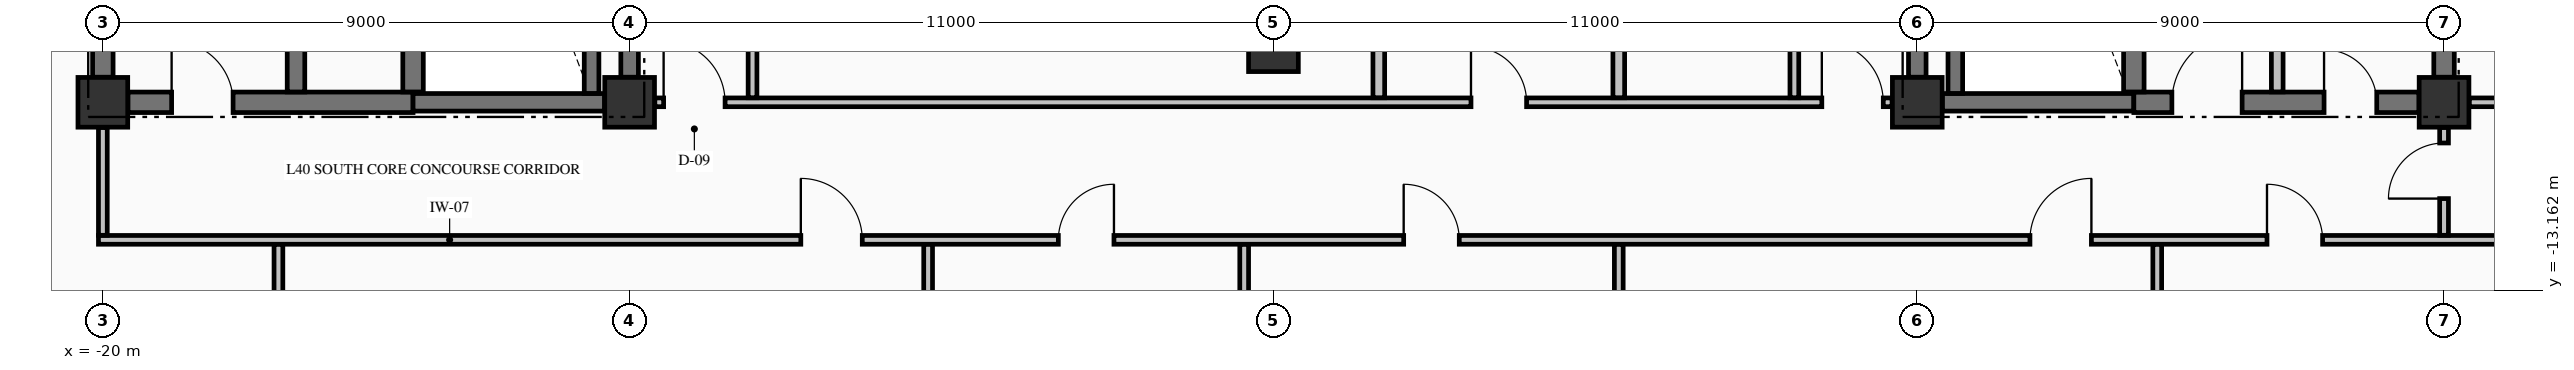
"""IFC4 building model, lengths in metres.
Left out: names, types, materials, properties, quantities, classifications, styles, units other than length and angle.
Written with IfcOpenShell. Run it as: python <this file> out.ifc"""

import sys

from ifc_helpers import new_model, si_unit, direction, frame, frame_2d, origin, origin_2d, place, context, subcontext, project, spatial, rectangle, extrude, element, fill, save


model = new_model("IFC4")
c1 = context("Model", 3, precision=1e-05, world=origin(), true_north=direction((0.0, 1.0)))
c2 = subcontext(c1, "Body", "Model", "MODEL_VIEW")
j1 = project(units=[si_unit("LENGTHUNIT", "METRE"), si_unit("PLANEANGLEUNIT", "RADIAN")], contexts=[c1])
p1 = place(None, origin())
s1 = spatial("IfcSite", under=j1, at=p1, CompositionType="ELEMENT")
p2 = place(p1, origin())
s2 = spatial("IfcBuilding", under=s1, at=p2, CompositionType="ELEMENT")
p3 = place(p2, frame((0.0, 0.0, 158.24)))
s3 = spatial("IfcBuildingStorey", under=s2, at=p3, CompositionType="ELEMENT", Elevation=158.24)
for number, where, z_axis, x_axis in (
    (1, (-20.0, -9.95, -0.425), (0.0, 0.0, 1.0), (1.0, 0.0, 0.0)),
    (2, (-11.0, -9.95, -0.425), (0.0, 0.0, 1.0), (1.0, 0.0, 0.0)),
    (3, (11.0, -9.95, -0.425), (0.0, 0.0, 1.0), (1.0, 0.0, 0.0)),
    (4, (20.0, -9.95, -0.425), (0.0, 0.0, 1.0), (1.0, 0.0, 0.0)),
    (5, (0.0, -9.0, -0.425), (0.0, 0.0, 1.0), (1.0, 0.0, 0.0)),
):
    element("IfcColumn", number, at=place(p3, frame(where, z_axis=z_axis, x_axis=x_axis)), inside=s3, PredefinedType="COLUMN", context=c2, shape_type="SweptSolid", body=[
        extrude(rectangle(XDim=0.85, YDim=0.85, at=origin_2d()), origin(), (0.0, 0.0, 1.0), 4.595),
    ])
p4 = place(p3, frame((-19.571, -9.95, 0.0), z_axis=(0.0, 0.0, 1.0), x_axis=(1.0, 0.0, 0.0)))
e6 = element("IfcWall", 6, at=p4, inside=s3, PredefinedType="SHEAR", context=c2, shape_type="SweptSolid", body=[
    extrude(rectangle(XDim=4.871, YDim=0.35, at=frame_2d((2.436, 0.0))), origin(), (0.0, 0.0, 1.0), 4.17),
])
p5 = place(p4, frame((0.746, 0.0, 0.0)))
e7 = element("IfcOpeningElement", 7, at=p5, cuts=e6, PredefinedType="OPENING", context=c2, shape_type="SweptSolid", body=[
    extrude(rectangle(XDim=1.05, YDim=2.15, at=frame_2d((0.525, 1.075))), frame((0.0, 0.185, 0.0), z_axis=(0.0, -1.0, 0.0), x_axis=(1.0, 0.0, 0.0)), (0.0, 0.0, 1.0), 0.37),
])
for number, where, z_axis, x_axis in (
    (8, (-14.7, -9.95, 0.0), (0.0, 0.0, 1.0), (1.0, 0.0, 0.0)),
    (9, (11.429, -9.95, 0.0), (0.0, 0.0, 1.0), (1.0, 0.0, 0.0)),
):
    element("IfcWall", number, at=place(p3, frame(where, z_axis=z_axis, x_axis=x_axis)), inside=s3, PredefinedType="SHEAR", context=c2, shape_type="SweptSolid", body=[
        extrude(rectangle(XDim=3.271, YDim=0.3, at=frame_2d((1.635, 0.0))), origin(), (0.0, 0.0, 1.0), 4.17),
    ])
p6 = place(p3, frame((14.7, -9.95, 0.0), z_axis=(0.0, 0.0, 1.0), x_axis=(1.0, 0.0, 0.0)))
e10 = element("IfcWall", 10, at=p6, inside=s3, PredefinedType="SHEAR", context=c2, shape_type="SweptSolid", body=[
    extrude(rectangle(XDim=4.871, YDim=0.35, at=frame_2d((2.436, 0.0))), origin(), (0.0, 0.0, 1.0), 4.17),
])
p7 = place(p6, frame((0.65, 0.0, 0.0)))
e11 = element("IfcOpeningElement", 11, at=p7, cuts=e10, PredefinedType="OPENING", context=c2, shape_type="SweptSolid", body=[
    extrude(rectangle(XDim=1.2, YDim=2.15, at=frame_2d((0.6, 1.075))), frame((0.0, 0.185, 0.0), z_axis=(0.0, -1.0, 0.0), x_axis=(1.0, 0.0, 0.0)), (0.0, 0.0, 1.0), 0.37),
])
p8 = place(p6, frame((3.25, 0.0, 0.0)))
e12 = element("IfcOpeningElement", 12, at=p8, cuts=e10, PredefinedType="OPENING", context=c2, shape_type="SweptSolid", body=[
    extrude(rectangle(XDim=0.9, YDim=2.15, at=frame_2d((0.45, 1.075))), frame((0.0, 0.185, 0.0), z_axis=(0.0, -1.0, 0.0), x_axis=(1.0, 0.0, 0.0)), (0.0, 0.0, 1.0), 0.37),
])
p9 = place(p3, frame((-20.075, -12.3, 0.0), z_axis=(0.0, 0.0, 1.0), x_axis=(1.0, 0.0, 0.0)))
e13 = element("IfcWall", 13, at=p9, inside=s3, PredefinedType="PARTITIONING", context=c2, shape_type="SweptSolid", body=[
    extrude(rectangle(XDim=46.91, YDim=0.15, at=frame_2d((23.455, 0.0))), origin(), (0.0, 0.0, 1.0), 4.17),
])
p10 = place(p9, frame((12.0, 0.0, 0.0)))
e14 = element("IfcOpeningElement", 14, at=p10, cuts=e13, PredefinedType="OPENING", context=c2, shape_type="SweptSolid", body=[
    extrude(rectangle(XDim=1.05, YDim=2.15, at=frame_2d((0.525, 1.075))), frame((0.0, 0.085, 0.0), z_axis=(0.0, -1.0, 0.0), x_axis=(1.0, 0.0, 0.0)), (0.0, 0.0, 1.0), 0.17),
])
p11 = place(p9, frame((16.4, 0.0, 0.0)))
e15 = element("IfcOpeningElement", 15, at=p11, cuts=e13, PredefinedType="OPENING", context=c2, shape_type="SweptSolid", body=[
    extrude(rectangle(XDim=0.95, YDim=2.15, at=frame_2d((0.475, 1.075))), frame((0.0, 0.085, 0.0), z_axis=(0.0, -1.0, 0.0), x_axis=(1.0, 0.0, 0.0)), (0.0, 0.0, 1.0), 0.17),
])
p12 = place(p9, frame((22.3, 0.0, 0.0)))
e16 = element("IfcOpeningElement", 16, at=p12, cuts=e13, PredefinedType="OPENING", context=c2, shape_type="SweptSolid", body=[
    extrude(rectangle(XDim=0.95, YDim=2.15, at=frame_2d((0.475, 1.075))), frame((0.0, 0.085, 0.0), z_axis=(0.0, -1.0, 0.0), x_axis=(1.0, 0.0, 0.0)), (0.0, 0.0, 1.0), 0.17),
])
p13 = place(p9, frame((33.0, 0.0, 0.0)))
e17 = element("IfcOpeningElement", 17, at=p13, cuts=e13, PredefinedType="OPENING", context=c2, shape_type="SweptSolid", body=[
    extrude(rectangle(XDim=1.05, YDim=2.15, at=frame_2d((0.525, 1.075))), frame((0.0, 0.085, 0.0), z_axis=(0.0, -1.0, 0.0), x_axis=(1.0, 0.0, 0.0)), (0.0, 0.0, 1.0), 0.17),
])
p14 = place(p9, frame((37.05, 0.0, 0.0)))
e18 = element("IfcOpeningElement", 18, at=p14, cuts=e13, PredefinedType="OPENING", context=c2, shape_type="SweptSolid", body=[
    extrude(rectangle(XDim=0.95, YDim=2.15, at=frame_2d((0.475, 1.075))), frame((0.0, 0.085, 0.0), z_axis=(0.0, -1.0, 0.0), x_axis=(1.0, 0.0, 0.0)), (0.0, 0.0, 1.0), 0.17),
])
p15 = place(p3, frame((-10.569, -9.95, 0.0), z_axis=(0.0, 0.0, 1.0), x_axis=(1.0, 0.0, 0.0)))
e19 = element("IfcWall", 19, at=p15, inside=s3, PredefinedType="PARTITIONING", context=c2, shape_type="SweptSolid", body=[
    extrude(rectangle(XDim=21.138, YDim=0.15, at=frame_2d((10.569, 0.0))), origin(), (0.0, 0.0, 1.0), 4.17),
])
p16 = place(p15, frame((0.15, 0.0, 0.0)))
e20 = element("IfcOpeningElement", 20, at=p16, cuts=e19, PredefinedType="OPENING", context=c2, shape_type="SweptSolid", body=[
    extrude(rectangle(XDim=1.05, YDim=2.15, at=frame_2d((0.525, 1.075))), frame((0.0, 0.085, 0.0), z_axis=(0.0, -1.0, 0.0), x_axis=(1.0, 0.0, 0.0)), (0.0, 0.0, 1.0), 0.17),
])
p17 = place(p15, frame((19.938, 0.0, 0.0)))
e21 = element("IfcOpeningElement", 21, at=p17, cuts=e19, PredefinedType="OPENING", context=c2, shape_type="SweptSolid", body=[
    extrude(rectangle(XDim=1.05, YDim=2.15, at=frame_2d((0.525, 1.075))), frame((0.0, 0.085, 0.0), z_axis=(0.0, -1.0, 0.0), x_axis=(1.0, 0.0, 0.0)), (0.0, 0.0, 1.0), 0.17),
])
p18 = place(p15, frame((13.944, 0.0, 0.0)))
e22 = element("IfcOpeningElement", 22, at=p18, cuts=e19, PredefinedType="OPENING", context=c2, shape_type="SweptSolid", body=[
    extrude(rectangle(XDim=0.95, YDim=2.15, at=frame_2d((0.475, 1.075))), frame((0.0, 0.085, 0.0), z_axis=(0.0, -1.0, 0.0), x_axis=(1.0, 0.0, 0.0)), (0.0, 0.0, 1.0), 0.17),
])
p19 = place(p3, frame((20.431, -9.95, 0.0), z_axis=(0.0, 0.0, 1.0), x_axis=(1.0, 0.0, 0.0)))
e23 = element("IfcWall", 23, at=p19, inside=s3, PredefinedType="PARTITIONING", context=c2, shape_type="SweptSolid", body=[
    extrude(rectangle(XDim=6.404, YDim=0.15, at=frame_2d((3.202, 0.0))), origin(), (0.0, 0.0, 1.0), 4.17),
])
p20 = place(p19, frame((2.594, 0.0, 0.0)))
e24 = element("IfcOpeningElement", 24, at=p20, cuts=e23, PredefinedType="OPENING", context=c2, shape_type="SweptSolid", body=[
    extrude(rectangle(XDim=0.95, YDim=2.15, at=frame_2d((0.475, 1.075))), frame((0.0, 0.085, 0.0), z_axis=(0.0, -1.0, 0.0), x_axis=(1.0, 0.0, 0.0)), (0.0, 0.0, 1.0), 0.17),
])
p21 = place(p3, frame((-20.0, -9.521, 0.0), z_axis=(0.0, 0.0, 1.0), x_axis=(0.0, 1.0, 0.0)))
e25 = element("IfcWall", 25, at=p21, inside=s3, PredefinedType="SHEAR", context=c2, shape_type="SweptSolid", body=[
    extrude(rectangle(XDim=9.092, YDim=0.35, at=frame_2d((4.546, 0.0))), origin(), (0.0, 0.0, 1.0), 4.17),
])
p22 = place(p3, frame((-16.7, -9.773, 0.0), z_axis=(0.0, 0.0, 1.0), x_axis=(0.0, 1.0, 0.0)))
e26 = element("IfcWall", 26, at=p22, inside=s3, PredefinedType="SHEAR", context=c2, shape_type="SweptSolid", body=[
    extrude(rectangle(XDim=9.371, YDim=0.3, at=frame_2d((4.686, 0.0))), origin(), (0.0, 0.0, 1.0), 4.17),
])
p23 = place(p3, frame((-14.7, -9.773, 0.0), z_axis=(0.0, 0.0, 1.0), x_axis=(0.0, 1.0, 0.0)))
e27 = element("IfcWall", 27, at=p23, inside=s3, PredefinedType="SHEAR", context=c2, shape_type="SweptSolid", body=[
    extrude(rectangle(XDim=9.371, YDim=0.35, at=frame_2d((4.686, 0.0))), origin(), (0.0, 0.0, 1.0), 4.17),
])
p24 = place(p3, frame((-11.65, -9.798, 0.0), z_axis=(0.0, 0.0, 1.0), x_axis=(0.0, 1.0, 0.0)))
e28 = element("IfcWall", 28, at=p24, inside=s3, PredefinedType="SOLIDWALL", context=c2, shape_type="SweptSolid", body=[
    extrude(rectangle(XDim=9.396, YDim=0.25, at=frame_2d((4.698, 0.0))), origin(), (0.0, 0.0, 1.0), 4.17),
])
for number, where, z_axis, x_axis in (
    (29, (-11.0, -9.521, 0.0), (0.0, 0.0, 1.0), (0.0, 1.0, 0.0)),
    (30, (11.0, -9.521, 0.0), (0.0, 0.0, 1.0), (0.0, 1.0, 0.0)),
):
    element("IfcWall", number, at=place(p3, frame(where, z_axis=z_axis, x_axis=x_axis)), inside=s3, PredefinedType="SHEAR", context=c2, shape_type="SweptSolid", body=[
        extrude(rectangle(XDim=9.092, YDim=0.3, at=frame_2d((4.546, 0.0))), origin(), (0.0, 0.0, 1.0), 4.17),
    ])
p25 = place(p3, frame((11.65, -9.798, 0.0), z_axis=(0.0, 0.0, 1.0), x_axis=(0.0, 1.0, 0.0)))
e31 = element("IfcWall", 31, at=p25, inside=s3, PredefinedType="SOLIDWALL", context=c2, shape_type="SweptSolid", body=[
    extrude(rectangle(XDim=9.396, YDim=0.25, at=frame_2d((4.698, 0.0))), origin(), (0.0, 0.0, 1.0), 4.17),
])
p26 = place(p3, frame((14.7, -9.773, 0.0), z_axis=(0.0, 0.0, 1.0), x_axis=(0.0, 1.0, 0.0)))
e32 = element("IfcWall", 32, at=p26, inside=s3, PredefinedType="SHEAR", context=c2, shape_type="SweptSolid", body=[
    extrude(rectangle(XDim=9.371, YDim=0.35, at=frame_2d((4.686, 0.0))), origin(), (0.0, 0.0, 1.0), 4.17),
])
p27 = place(p3, frame((20.0, -9.521, 0.0), z_axis=(0.0, 0.0, 1.0), x_axis=(0.0, 1.0, 0.0)))
e33 = element("IfcWall", 33, at=p27, inside=s3, PredefinedType="SHEAR", context=c2, shape_type="SweptSolid", body=[
    extrude(rectangle(XDim=2.344, YDim=0.35, at=frame_2d((1.172, 0.0))), origin(), (0.0, 0.0, 1.0), 4.17),
])
p28 = place(p3, frame((-20.0, -12.222, 0.0), z_axis=(0.0, 0.0, 1.0), x_axis=(0.0, 1.0, 0.0)))
e34 = element("IfcWall", 34, at=p28, inside=s3, PredefinedType="PARTITIONING", context=c2, shape_type="SweptSolid", body=[
    extrude(rectangle(XDim=1.841, YDim=0.15, at=frame_2d((0.92, 0.0))), origin(), (0.0, 0.0, 1.0), 3.36),
])
p29 = place(p3, frame((-17.0, -18.994, 0.0), z_axis=(0.0, 0.0, 1.0), x_axis=(0.0, 1.0, 0.0)))
e35 = element("IfcWall", 35, at=p29, inside=s3, PredefinedType="PARTITIONING", context=c2, shape_type="SweptSolid", body=[
    extrude(rectangle(XDim=6.616, YDim=0.15, at=frame_2d((3.308, 0.0))), origin(), (0.0, 0.0, 1.0), 4.17),
])
p30 = place(p3, frame((-8.9, -9.872, 0.0), z_axis=(0.0, 0.0, 1.0), x_axis=(0.0, 1.0, 0.0)))
e36 = element("IfcWall", 36, at=p30, inside=s3, PredefinedType="PARTITIONING", context=c2, shape_type="SweptSolid", body=[
    extrude(rectangle(XDim=5.769, YDim=0.15, at=frame_2d((2.885, 0.0))), origin(), (0.0, 0.0, 1.0), 4.17),
])
p31 = place(p30, frame((2.427, 0.0, 0.0)))
e37 = element("IfcOpeningElement", 37, at=p31, cuts=e36, PredefinedType="OPENING", context=c2, shape_type="SweptSolid", body=[
    extrude(rectangle(XDim=0.95, YDim=2.15, at=frame_2d((0.475, 1.075))), frame((0.0, 0.085, 0.0), z_axis=(0.0, -1.0, 0.0), x_axis=(1.0, 0.0, 0.0)), (0.0, 0.0, 1.0), 0.17),
])
p32 = place(p3, frame((-5.9, -24.335, 0.0), z_axis=(0.0, 0.0, 1.0), x_axis=(0.0, 1.0, 0.0)))
e38 = element("IfcWall", 38, at=p32, inside=s3, PredefinedType="PARTITIONING", context=c2, shape_type="SweptSolid", body=[
    extrude(rectangle(XDim=11.957, YDim=0.15, at=frame_2d((5.979, 0.0))), origin(), (0.0, 0.0, 1.0), 4.17),
])
p33 = place(p3, frame((-0.5, -23.994, 0.0), z_axis=(0.0, 0.0, 1.0), x_axis=(0.0, 1.0, 0.0)))
e39 = element("IfcWall", 39, at=p33, inside=s3, PredefinedType="PARTITIONING", context=c2, shape_type="SweptSolid", body=[
    extrude(rectangle(XDim=11.616, YDim=0.15, at=frame_2d((5.808, 0.0))), origin(), (0.0, 0.0, 1.0), 4.17),
])
p34 = place(p3, frame((1.8, -9.872, 0.0), z_axis=(0.0, 0.0, 1.0), x_axis=(0.0, 1.0, 0.0)))
e40 = element("IfcWall", 40, at=p34, inside=s3, PredefinedType="PARTITIONING", context=c2, shape_type="SweptSolid", body=[
    extrude(rectangle(XDim=4.969, YDim=0.2, at=frame_2d((2.484, 0.0))), origin(), (0.0, 0.0, 1.0), 4.17),
])
p35 = place(p3, frame((5.9, -24.335, 0.0), z_axis=(0.0, 0.0, 1.0), x_axis=(0.0, 1.0, 0.0)))
e41 = element("IfcWall", 41, at=p35, inside=s3, PredefinedType="PARTITIONING", context=c2, shape_type="SweptSolid", body=[
    extrude(rectangle(XDim=11.957, YDim=0.15, at=frame_2d((5.979, 0.0))), origin(), (0.0, 0.0, 1.0), 4.17),
])
p36 = place(p3, frame((5.9, -9.872, 0.0), z_axis=(0.0, 0.0, 1.0), x_axis=(0.0, 1.0, 0.0)))
e42 = element("IfcWall", 42, at=p36, inside=s3, PredefinedType="PARTITIONING", context=c2, shape_type="SweptSolid", body=[
    extrude(rectangle(XDim=4.969, YDim=0.2, at=frame_2d((2.484, 0.0))), origin(), (0.0, 0.0, 1.0), 4.17),
])
p37 = place(p3, frame((8.9, -9.872, 0.0), z_axis=(0.0, 0.0, 1.0), x_axis=(0.0, 1.0, 0.0)))
e43 = element("IfcWall", 43, at=p37, inside=s3, PredefinedType="PARTITIONING", context=c2, shape_type="SweptSolid", body=[
    extrude(rectangle(XDim=4.969, YDim=0.15, at=frame_2d((2.484, 0.0))), origin(), (0.0, 0.0, 1.0), 4.17),
])
p38 = place(p37, frame((1.997, 0.0, 0.0)))
e44 = element("IfcOpeningElement", 44, at=p38, cuts=e43, PredefinedType="OPENING", context=c2, shape_type="SweptSolid", body=[
    extrude(rectangle(XDim=0.95, YDim=2.15, at=frame_2d((0.475, 1.075))), frame((0.0, 0.085, 0.0), z_axis=(0.0, -1.0, 0.0), x_axis=(1.0, 0.0, 0.0)), (0.0, 0.0, 1.0), 0.17),
])
p39 = place(p3, frame((15.1, -24.335, 0.0), z_axis=(0.0, 0.0, 1.0), x_axis=(0.0, 1.0, 0.0)))
e45 = element("IfcWall", 45, at=p39, inside=s3, PredefinedType="PARTITIONING", context=c2, shape_type="SweptSolid", body=[
    extrude(rectangle(XDim=11.957, YDim=0.15, at=frame_2d((5.979, 0.0))), origin(), (0.0, 0.0, 1.0), 4.17),
])
p40 = place(p3, frame((17.15, -9.772, 0.0), z_axis=(0.0, 0.0, 1.0), x_axis=(0.0, 1.0, 0.0)))
e46 = element("IfcWall", 46, at=p40, inside=s3, PredefinedType="PARTITIONING", context=c2, shape_type="SweptSolid", body=[
    extrude(rectangle(XDim=2.594, YDim=0.2, at=frame_2d((1.297, 0.0))), origin(), (0.0, 0.0, 1.0), 4.17),
])
p41 = place(p3, frame((20.0, -12.222, 0.0), z_axis=(0.0, 0.0, 1.0), x_axis=(0.0, 1.0, 0.0)))
e47 = element("IfcWall", 47, at=p41, inside=s3, PredefinedType="PARTITIONING", context=c2, shape_type="SweptSolid", body=[
    extrude(rectangle(XDim=1.841, YDim=0.15, at=frame_2d((0.92, 0.0))), origin(), (0.0, 0.0, 1.0), 3.36),
])
p42 = place(p41, frame((0.627, 0.0, 0.0)))
e48 = element("IfcOpeningElement", 48, at=p42, cuts=e47, PredefinedType="OPENING", context=c2, shape_type="SweptSolid", body=[
    extrude(rectangle(XDim=0.95, YDim=2.15, at=frame_2d((0.475, 1.075))), frame((0.0, 0.085, 0.0), z_axis=(0.0, -1.0, 0.0), x_axis=(1.0, 0.0, 0.0)), (0.0, 0.0, 1.0), 0.17),
])
p43 = place(p5, origin())
e49 = element("IfcDoor", 49, at=p43, inside=s3, OperationType="SINGLE_SWING_LEFT", PredefinedType="DOOR", context=c2, shape_type="SweptSolid", body=[
    extrude(rectangle(XDim=1.05, YDim=2.15, at=frame_2d((0.525, 1.075))), frame((0.0, 0.025, 0.0), z_axis=(0.0, -1.0, 0.0), x_axis=(1.0, 0.0, 0.0)), (0.0, 0.0, 1.0), 0.05),
])
fill(e7, e49)
p44 = place(p7, origin())
e50 = element("IfcDoor", 50, at=p44, inside=s3, OperationType="SINGLE_SWING_RIGHT", PredefinedType="DOOR", context=c2, shape_type="SweptSolid", body=[
    extrude(rectangle(XDim=1.2, YDim=2.15, at=frame_2d((0.6, 1.075))), frame((0.0, 0.025, 0.0), z_axis=(0.0, -1.0, 0.0), x_axis=(1.0, 0.0, 0.0)), (0.0, 0.0, 1.0), 0.05),
])
fill(e11, e50)
p45 = place(p8, origin())
e51 = element("IfcDoor", 51, at=p45, inside=s3, OperationType="SINGLE_SWING_LEFT", PredefinedType="DOOR", context=c2, shape_type="SweptSolid", body=[
    extrude(rectangle(XDim=0.9, YDim=2.15, at=frame_2d((0.45, 1.075))), frame((0.0, 0.025, 0.0), z_axis=(0.0, -1.0, 0.0), x_axis=(1.0, 0.0, 0.0)), (0.0, 0.0, 1.0), 0.05),
])
fill(e12, e51)
p46 = place(p16, origin())
e52 = element("IfcDoor", 52, at=p46, inside=s3, OperationType="SINGLE_SWING_LEFT", PredefinedType="DOOR", context=c2, shape_type="SweptSolid", body=[
    extrude(rectangle(XDim=1.05, YDim=2.15, at=frame_2d((0.525, 1.075))), frame((0.0, 0.025, 0.0), z_axis=(0.0, -1.0, 0.0), x_axis=(1.0, 0.0, 0.0)), (0.0, 0.0, 1.0), 0.05),
])
fill(e20, e52)
p47 = place(p17, origin())
e53 = element("IfcDoor", 53, at=p47, inside=s3, OperationType="SINGLE_SWING_LEFT", PredefinedType="DOOR", context=c2, shape_type="SweptSolid", body=[
    extrude(rectangle(XDim=1.05, YDim=2.15, at=frame_2d((0.525, 1.075))), frame((0.0, 0.025, 0.0), z_axis=(0.0, -1.0, 0.0), x_axis=(1.0, 0.0, 0.0)), (0.0, 0.0, 1.0), 0.05),
])
fill(e21, e53)
p48 = place(p10, origin())
e54 = element("IfcDoor", 54, at=p48, inside=s3, OperationType="SINGLE_SWING_LEFT", PredefinedType="DOOR", context=c2, shape_type="SweptSolid", body=[
    extrude(rectangle(XDim=1.05, YDim=2.15, at=frame_2d((0.525, 1.075))), frame((0.0, 0.025, 0.0), z_axis=(0.0, -1.0, 0.0), x_axis=(1.0, 0.0, 0.0)), (0.0, 0.0, 1.0), 0.05),
])
fill(e14, e54)
p49 = place(p11, origin())
e55 = element("IfcDoor", 55, at=p49, inside=s3, OperationType="SINGLE_SWING_RIGHT", PredefinedType="DOOR", context=c2, shape_type="SweptSolid", body=[
    extrude(rectangle(XDim=0.95, YDim=2.15, at=frame_2d((0.475, 1.075))), frame((0.0, 0.025, 0.0), z_axis=(0.0, -1.0, 0.0), x_axis=(1.0, 0.0, 0.0)), (0.0, 0.0, 1.0), 0.05),
])
fill(e15, e55)
p50 = place(p12, origin())
e56 = element("IfcDoor", 56, at=p50, inside=s3, OperationType="SINGLE_SWING_LEFT", PredefinedType="DOOR", context=c2, shape_type="SweptSolid", body=[
    extrude(rectangle(XDim=0.95, YDim=2.15, at=frame_2d((0.475, 1.075))), frame((0.0, 0.025, 0.0), z_axis=(0.0, -1.0, 0.0), x_axis=(1.0, 0.0, 0.0)), (0.0, 0.0, 1.0), 0.05),
])
fill(e16, e56)
p51 = place(p13, origin())
e57 = element("IfcDoor", 57, at=p51, inside=s3, OperationType="SINGLE_SWING_RIGHT", PredefinedType="DOOR", context=c2, shape_type="SweptSolid", body=[
    extrude(rectangle(XDim=1.05, YDim=2.15, at=frame_2d((0.525, 1.075))), frame((0.0, 0.025, 0.0), z_axis=(0.0, -1.0, 0.0), x_axis=(1.0, 0.0, 0.0)), (0.0, 0.0, 1.0), 0.05),
])
fill(e17, e57)
p52 = place(p14, origin())
e58 = element("IfcDoor", 58, at=p52, inside=s3, OperationType="SINGLE_SWING_LEFT", PredefinedType="DOOR", context=c2, shape_type="SweptSolid", body=[
    extrude(rectangle(XDim=0.95, YDim=2.15, at=frame_2d((0.475, 1.075))), frame((0.0, 0.025, 0.0), z_axis=(0.0, -1.0, 0.0), x_axis=(1.0, 0.0, 0.0)), (0.0, 0.0, 1.0), 0.05),
])
fill(e18, e58)
p53 = place(p18, origin())
e59 = element("IfcDoor", 59, at=p53, inside=s3, OperationType="SINGLE_SWING_LEFT", PredefinedType="DOOR", context=c2, shape_type="SweptSolid", body=[
    extrude(rectangle(XDim=0.95, YDim=2.15, at=frame_2d((0.475, 1.075))), frame((0.0, 0.025, 0.0), z_axis=(0.0, -1.0, 0.0), x_axis=(1.0, 0.0, 0.0)), (0.0, 0.0, 1.0), 0.05),
])
fill(e22, e59)
p54 = place(p42, origin())
e60 = element("IfcDoor", 60, at=p54, inside=s3, OperationType="SINGLE_SWING_LEFT", PredefinedType="DOOR", context=c2, shape_type="SweptSolid", body=[
    extrude(rectangle(XDim=0.95, YDim=2.15, at=frame_2d((0.475, 1.075))), frame((0.0, 0.025, 0.0), z_axis=(0.0, -1.0, 0.0), x_axis=(1.0, 0.0, 0.0)), (0.0, 0.0, 1.0), 0.05),
])
fill(e48, e60)
save(model, sys.argv[1])
